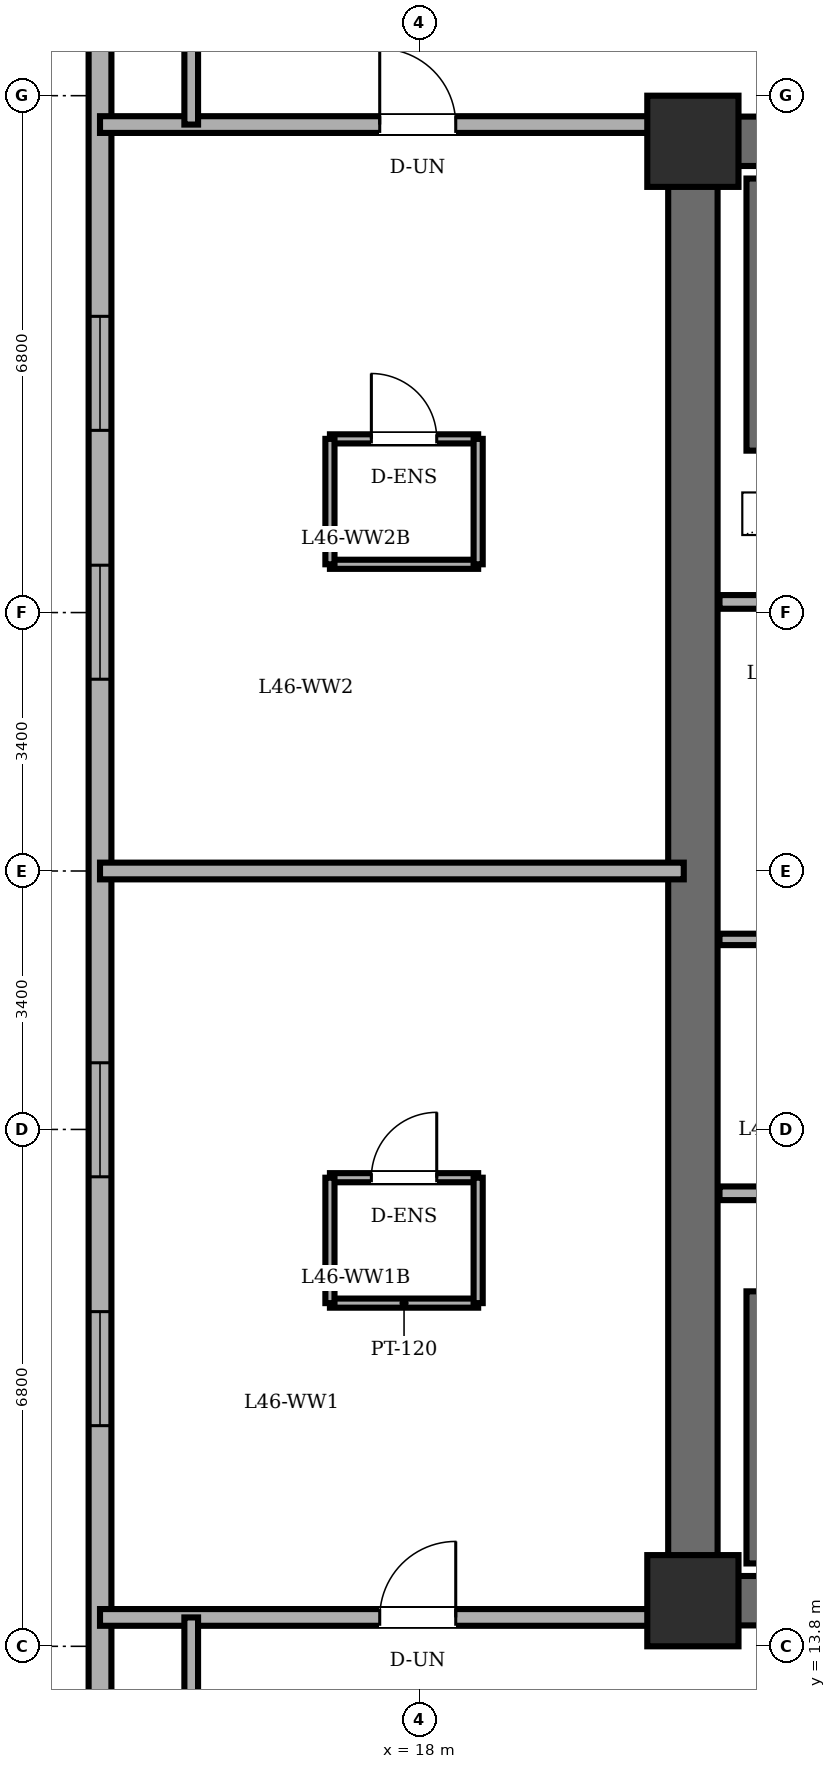
"""IFC4 building model, lengths in metres.
Left out: names, types, materials, properties, quantities, classifications, styles, units other than length and angle.
Written with IfcOpenShell. Run it as: python <this file> out.ifc"""

import sys

from ifc_helpers import new_model, si_unit, direction, frame, frame_2d, origin, origin_2d, place, context, subcontext, project, spatial, rectangle, extrude, element, fill, save


model = new_model("IFC4")
c1 = context("Model", 3, precision=1e-05, world=origin(), true_north=direction((0.0, 1.0)))
c2 = subcontext(c1, "Body", "Model", "MODEL_VIEW")
j1 = project(units=[si_unit("LENGTHUNIT", "METRE"), si_unit("PLANEANGLEUNIT", "RADIAN")], contexts=[c1])
p1 = place(None, origin())
s1 = spatial("IfcSite", under=j1, at=p1, CompositionType="ELEMENT")
p2 = place(p1, origin())
s2 = spatial("IfcBuilding", under=s1, at=p2, CompositionType="ELEMENT")
p3 = place(p2, frame((0.0, 0.0, 176.2)))
s3 = spatial("IfcBuildingStorey", under=s2, at=p3, CompositionType="ELEMENT", Elevation=176.2)
for number, where, z_axis, x_axis in (
    (1, (21.6, 14.4, 0.0), (0.0, 0.0, 1.0), (1.0, 0.0, 0.0)),
    (2, (21.6, 33.6, 0.0), (0.0, 0.0, 1.0), (1.0, 0.0, 0.0)),
):
    element("IfcColumn", number, at=place(p3, frame(where, z_axis=z_axis, x_axis=x_axis)), inside=s3, PredefinedType="COLUMN", context=c2, shape_type="SweptSolid", body=[
        extrude(rectangle(XDim=1.2, YDim=1.2, at=origin_2d()), origin(), (0.0, 0.0, 1.0), 3.6),
    ])
p4 = place(p3, frame((13.8, 36.3, 0.0), z_axis=(0.0, 0.0, 1.0), x_axis=(0.0, -1.0, 0.0)))
e3 = element("IfcWall", 3, at=p4, inside=s3, PredefinedType="SOLIDWALL", context=c2, shape_type="SweptSolid", body=[
    extrude(rectangle(XDim=24.6, YDim=0.3, at=frame_2d((12.3, 0.0))), origin(), (0.0, 0.0, 1.0), 3.4),
])
p5 = place(p4, frame((5.003, 0.0, 0.85)))
e4 = element("IfcOpeningElement", 4, at=p5, cuts=e3, PredefinedType="OPENING", context=c2, shape_type="SweptSolid", body=[
    extrude(rectangle(XDim=1.5, YDim=1.55, at=frame_2d((0.75, 0.775))), frame((0.0, 0.16, 0.0), z_axis=(0.0, -1.0, 0.0), x_axis=(1.0, 0.0, 0.0)), (0.0, 0.0, 1.0), 0.32),
])
p6 = place(p4, frame((8.277, 0.0, 0.85)))
e5 = element("IfcOpeningElement", 5, at=p6, cuts=e3, PredefinedType="OPENING", context=c2, shape_type="SweptSolid", body=[
    extrude(rectangle(XDim=1.5, YDim=1.55, at=frame_2d((0.75, 0.775))), frame((0.0, 0.16, 0.0), z_axis=(0.0, -1.0, 0.0), x_axis=(1.0, 0.0, 0.0)), (0.0, 0.0, 1.0), 0.32),
])
p7 = place(p4, frame((14.823, 0.0, 0.85)))
e6 = element("IfcOpeningElement", 6, at=p7, cuts=e3, PredefinedType="OPENING", context=c2, shape_type="SweptSolid", body=[
    extrude(rectangle(XDim=1.5, YDim=1.55, at=frame_2d((0.75, 0.775))), frame((0.0, 0.16, 0.0), z_axis=(0.0, -1.0, 0.0), x_axis=(1.0, 0.0, 0.0)), (0.0, 0.0, 1.0), 0.32),
])
p8 = place(p4, frame((18.097, 0.0, 0.85)))
e7 = element("IfcOpeningElement", 7, at=p8, cuts=e3, PredefinedType="OPENING", context=c2, shape_type="SweptSolid", body=[
    extrude(rectangle(XDim=1.5, YDim=1.55, at=frame_2d((0.75, 0.775))), frame((0.0, 0.16, 0.0), z_axis=(0.0, -1.0, 0.0), x_axis=(1.0, 0.0, 0.0)), (0.0, 0.0, 1.0), 0.32),
])
p9 = place(p3, frame((21.6, 14.4, 0.0), z_axis=(0.0, 0.0, 1.0), x_axis=(0.0, 1.0, 0.0)))
e8 = element("IfcWall", 8, at=p9, inside=s3, PredefinedType="SHEAR", context=c2, shape_type="SweptSolid", body=[
    extrude(rectangle(XDim=19.2, YDim=0.65, at=frame_2d((9.6, 0.0))), origin(), (0.0, 0.0, 1.0), 3.4),
])
for number, where, z_axis, x_axis in (
    (9, (21.6, 33.6, 0.0), (0.0, 0.0, 1.0), (1.0, 0.0, 0.0)),
    (10, (37.2, 14.4, 0.0), (0.0, 0.0, 1.0), (-1.0, 0.0, 0.0)),
):
    element("IfcWall", number, at=place(p3, frame(where, z_axis=z_axis, x_axis=x_axis)), inside=s3, PredefinedType="SHEAR", context=c2, shape_type="SweptSolid", body=[
        extrude(rectangle(XDim=15.6, YDim=0.65, at=frame_2d((7.8, 0.0))), origin(), (0.0, 0.0, 1.0), 3.4),
    ])
for number, where, z_axis, x_axis in (
    (11, (22.48, 29.53, 0.0), (0.0, 0.0, 1.0), (0.0, 1.0, 0.0)),
    (12, (22.48, 14.89, 0.0), (0.0, 0.0, 1.0), (0.0, 1.0, 0.0)),
):
    element("IfcWall", number, at=place(p3, frame(where, z_axis=z_axis, x_axis=x_axis)), inside=s3, PredefinedType="SOLIDWALL", context=c2, shape_type="SweptSolid", body=[
        extrude(rectangle(XDim=3.58, YDim=0.35, at=frame_2d((1.79, 0.0))), origin(), (0.0, 0.0, 1.0), 3.4),
    ])
p10 = place(p3, frame((21.95, 27.54, 0.0), z_axis=(0.0, 0.0, 1.0), x_axis=(1.0, 0.0, 0.0)))
e13 = element("IfcWall", 13, at=p10, inside=s3, PredefinedType="PARTITIONING", context=c2, shape_type="SweptSolid", body=[
    extrude(rectangle(XDim=10.56, YDim=0.18, at=frame_2d((5.28, 0.0))), origin(), (0.0, 0.0, 1.0), 3.4),
])
p11 = place(p3, frame((21.95, 19.76, 0.0), z_axis=(0.0, 0.0, 1.0), x_axis=(1.0, 0.0, 0.0)))
e14 = element("IfcWall", 14, at=p11, inside=s3, PredefinedType="PARTITIONING", context=c2, shape_type="SweptSolid", body=[
    extrude(rectangle(XDim=14.87, YDim=0.18, at=frame_2d((7.435, 0.0))), origin(), (0.0, 0.0, 1.0), 3.4),
])
p12 = place(p3, frame((21.95, 23.1, 0.0), z_axis=(0.0, 0.0, 1.0), x_axis=(1.0, 0.0, 0.0)))
e15 = element("IfcWall", 15, at=p12, inside=s3, PredefinedType="PARTITIONING", context=c2, shape_type="SweptSolid", body=[
    extrude(rectangle(XDim=2.51, YDim=0.15, at=frame_2d((1.255, 0.0))), origin(), (0.0, 0.0, 1.0), 3.4),
])
p13 = place(p3, frame((16.825, 19.965, 0.0), z_axis=(0.0, 0.0, 1.0), x_axis=(1.0, 0.0, 0.0)))
e16 = element("IfcWall", 16, at=p13, inside=s3, PredefinedType="PARTITIONING", context=c2, shape_type="SweptSolid", body=[
    extrude(rectangle(XDim=1.95, YDim=0.12, at=frame_2d((0.975, 0.0))), origin(), (0.0, 0.0, 1.0), 3.4),
])
p14 = place(p13, frame((0.545, 0.0, 0.0)))
e17 = element("IfcOpeningElement", 17, at=p14, cuts=e16, PredefinedType="OPENING", context=c2, shape_type="SweptSolid", body=[
    extrude(rectangle(XDim=0.86, YDim=2.1, at=frame_2d((0.43, 1.05))), frame((0.0, 0.07, 0.0), z_axis=(0.0, -1.0, 0.0), x_axis=(1.0, 0.0, 0.0)), (0.0, 0.0, 1.0), 0.14),
])
p15 = place(p3, frame((18.775, 18.315, 0.0), z_axis=(0.0, 0.0, 1.0), x_axis=(-1.0, 0.0, 0.0)))
e18 = element("IfcWall", 18, at=p15, inside=s3, PredefinedType="PARTITIONING", context=c2, shape_type="SweptSolid", body=[
    extrude(rectangle(XDim=1.95, YDim=0.12, at=frame_2d((0.975, 0.0))), origin(), (0.0, 0.0, 1.0), 3.4),
])
for number, where, z_axis, x_axis in (
    (19, (16.825, 19.965, 0.0), (0.0, 0.0, 1.0), (0.0, -1.0, 0.0)),
    (20, (18.775, 18.315, 0.0), (0.0, 0.0, 1.0), (0.0, 1.0, 0.0)),
):
    element("IfcWall", number, at=place(p3, frame(where, z_axis=z_axis, x_axis=x_axis)), inside=s3, PredefinedType="PARTITIONING", context=c2, shape_type="SweptSolid", body=[
        extrude(rectangle(XDim=1.65, YDim=0.12, at=frame_2d((0.825, 0.0))), origin(), (0.0, 0.0, 1.0), 3.4),
    ])
p16 = place(p3, frame((16.825, 29.685, 0.0), z_axis=(0.0, 0.0, 1.0), x_axis=(1.0, 0.0, 0.0)))
e21 = element("IfcWall", 21, at=p16, inside=s3, PredefinedType="PARTITIONING", context=c2, shape_type="SweptSolid", body=[
    extrude(rectangle(XDim=1.95, YDim=0.12, at=frame_2d((0.975, 0.0))), origin(), (0.0, 0.0, 1.0), 3.4),
])
p17 = place(p16, frame((0.545, 0.0, 0.0)))
e22 = element("IfcOpeningElement", 22, at=p17, cuts=e21, PredefinedType="OPENING", context=c2, shape_type="SweptSolid", body=[
    extrude(rectangle(XDim=0.86, YDim=2.1, at=frame_2d((0.43, 1.05))), frame((0.0, 0.07, 0.0), z_axis=(0.0, -1.0, 0.0), x_axis=(1.0, 0.0, 0.0)), (0.0, 0.0, 1.0), 0.14),
])
p18 = place(p3, frame((18.775, 28.035, 0.0), z_axis=(0.0, 0.0, 1.0), x_axis=(-1.0, 0.0, 0.0)))
e23 = element("IfcWall", 23, at=p18, inside=s3, PredefinedType="PARTITIONING", context=c2, shape_type="SweptSolid", body=[
    extrude(rectangle(XDim=1.95, YDim=0.12, at=frame_2d((0.975, 0.0))), origin(), (0.0, 0.0, 1.0), 3.4),
])
for number, where, z_axis, x_axis in (
    (24, (16.825, 29.685, 0.0), (0.0, 0.0, 1.0), (0.0, -1.0, 0.0)),
    (25, (18.775, 28.035, 0.0), (0.0, 0.0, 1.0), (0.0, 1.0, 0.0)),
):
    element("IfcWall", number, at=place(p3, frame(where, z_axis=z_axis, x_axis=x_axis)), inside=s3, PredefinedType="PARTITIONING", context=c2, shape_type="SweptSolid", body=[
        extrude(rectangle(XDim=1.65, YDim=0.12, at=frame_2d((0.825, 0.0))), origin(), (0.0, 0.0, 1.0), 3.4),
    ])
p19 = place(p3, frame((13.8, 14.18, 0.0), z_axis=(0.0, 0.0, 1.0), x_axis=(1.0, 0.0, 0.0)))
e26 = element("IfcWall", 26, at=p19, inside=s3, PredefinedType="PARTITIONING", context=c2, shape_type="SweptSolid", body=[
    extrude(rectangle(XDim=7.68, YDim=0.22, at=frame_2d((3.84, 0.0))), origin(), (0.0, 0.0, 1.0), 3.4),
])
p20 = place(p19, frame((3.68, 0.0, 0.0)))
e27 = element("IfcOpeningElement", 27, at=p20, cuts=e26, PredefinedType="OPENING", context=c2, shape_type="SweptSolid", body=[
    extrude(rectangle(XDim=1.0, YDim=2.15, at=frame_2d((0.5, 1.075))), frame((0.0, 0.12, 0.0), z_axis=(0.0, -1.0, 0.0), x_axis=(1.0, 0.0, 0.0)), (0.0, 0.0, 1.0), 0.24),
])
p21 = place(p3, frame((13.8, 24.0, 0.0), z_axis=(0.0, 0.0, 1.0), x_axis=(1.0, 0.0, 0.0)))
e28 = element("IfcWall", 28, at=p21, inside=s3, PredefinedType="PARTITIONING", context=c2, shape_type="SweptSolid", body=[
    extrude(rectangle(XDim=7.68, YDim=0.22, at=frame_2d((3.84, 0.0))), origin(), (0.0, 0.0, 1.0), 3.4),
])
p22 = place(p3, frame((13.8, 33.82, 0.0), z_axis=(0.0, 0.0, 1.0), x_axis=(1.0, 0.0, 0.0)))
e29 = element("IfcWall", 29, at=p22, inside=s3, PredefinedType="PARTITIONING", context=c2, shape_type="SweptSolid", body=[
    extrude(rectangle(XDim=7.68, YDim=0.22, at=frame_2d((3.84, 0.0))), origin(), (0.0, 0.0, 1.0), 3.4),
])
p23 = place(p22, frame((3.68, 0.0, 0.0)))
e30 = element("IfcOpeningElement", 30, at=p23, cuts=e29, PredefinedType="OPENING", context=c2, shape_type="SweptSolid", body=[
    extrude(rectangle(XDim=1.0, YDim=2.15, at=frame_2d((0.5, 1.075))), frame((0.0, 0.12, 0.0), z_axis=(0.0, -1.0, 0.0), x_axis=(1.0, 0.0, 0.0)), (0.0, 0.0, 1.0), 0.24),
])
for number, where, z_axis, x_axis in (
    (31, (15.0, 8.487, 0.0), (0.0, 0.0, 1.0), (0.0, 1.0, 0.0)),
    (32, (15.0, 33.82, 0.0), (0.0, 0.0, 1.0), (0.0, 1.0, 0.0)),
):
    element("IfcWall", number, at=place(p3, frame(where, z_axis=z_axis, x_axis=x_axis)), inside=s3, PredefinedType="PARTITIONING", context=c2, shape_type="SweptSolid", body=[
        extrude(rectangle(XDim=5.693, YDim=0.18, at=frame_2d((2.846, 0.0))), origin(), (0.0, 0.0, 1.0), 3.4),
    ])
p24 = place(p5, origin())
e33 = element("IfcWindow", 33, at=p24, inside=s3, PartitioningType="DOUBLE_PANEL_VERTICAL", PredefinedType="WINDOW", context=c2, shape_type="SweptSolid", body=[
    extrude(rectangle(XDim=1.5, YDim=1.55, at=frame_2d((0.75, 0.775))), frame((0.0, 0.03, 0.0), z_axis=(0.0, -1.0, 0.0), x_axis=(1.0, 0.0, 0.0)), (0.0, 0.0, 1.0), 0.06),
])
fill(e4, e33)
p25 = place(p6, origin())
e34 = element("IfcWindow", 34, at=p25, inside=s3, PartitioningType="DOUBLE_PANEL_VERTICAL", PredefinedType="WINDOW", context=c2, shape_type="SweptSolid", body=[
    extrude(rectangle(XDim=1.5, YDim=1.55, at=frame_2d((0.75, 0.775))), frame((0.0, 0.03, 0.0), z_axis=(0.0, -1.0, 0.0), x_axis=(1.0, 0.0, 0.0)), (0.0, 0.0, 1.0), 0.06),
])
fill(e5, e34)
p26 = place(p7, origin())
e35 = element("IfcWindow", 35, at=p26, inside=s3, PartitioningType="DOUBLE_PANEL_VERTICAL", PredefinedType="WINDOW", context=c2, shape_type="SweptSolid", body=[
    extrude(rectangle(XDim=1.5, YDim=1.55, at=frame_2d((0.75, 0.775))), frame((0.0, 0.03, 0.0), z_axis=(0.0, -1.0, 0.0), x_axis=(1.0, 0.0, 0.0)), (0.0, 0.0, 1.0), 0.06),
])
fill(e6, e35)
p27 = place(p8, origin())
e36 = element("IfcWindow", 36, at=p27, inside=s3, PartitioningType="DOUBLE_PANEL_VERTICAL", PredefinedType="WINDOW", context=c2, shape_type="SweptSolid", body=[
    extrude(rectangle(XDim=1.5, YDim=1.55, at=frame_2d((0.75, 0.775))), frame((0.0, 0.03, 0.0), z_axis=(0.0, -1.0, 0.0), x_axis=(1.0, 0.0, 0.0)), (0.0, 0.0, 1.0), 0.06),
])
fill(e7, e36)
p28 = place(p14, origin())
e37 = element("IfcDoor", 37, at=p28, inside=s3, OperationType="SINGLE_SWING_RIGHT", PredefinedType="DOOR", context=c2, shape_type="SweptSolid", body=[
    extrude(rectangle(XDim=0.86, YDim=2.1, at=frame_2d((0.43, 1.05))), frame((0.0, 0.025, 0.0), z_axis=(0.0, -1.0, 0.0), x_axis=(1.0, 0.0, 0.0)), (0.0, 0.0, 1.0), 0.05),
])
fill(e17, e37)
p29 = place(p17, origin())
e38 = element("IfcDoor", 38, at=p29, inside=s3, OperationType="SINGLE_SWING_LEFT", PredefinedType="DOOR", context=c2, shape_type="SweptSolid", body=[
    extrude(rectangle(XDim=0.86, YDim=2.1, at=frame_2d((0.43, 1.05))), frame((0.0, 0.025, 0.0), z_axis=(0.0, -1.0, 0.0), x_axis=(1.0, 0.0, 0.0)), (0.0, 0.0, 1.0), 0.05),
])
fill(e22, e38)
p30 = place(p20, origin())
e39 = element("IfcDoor", 39, at=p30, inside=s3, OperationType="SINGLE_SWING_RIGHT", PredefinedType="DOOR", context=c2, shape_type="SweptSolid", body=[
    extrude(rectangle(XDim=1.0, YDim=2.15, at=frame_2d((0.5, 1.075))), frame((0.0, 0.025, 0.0), z_axis=(0.0, -1.0, 0.0), x_axis=(1.0, 0.0, 0.0)), (0.0, 0.0, 1.0), 0.05),
])
fill(e27, e39)
p31 = place(p23, origin())
e40 = element("IfcDoor", 40, at=p31, inside=s3, OperationType="SINGLE_SWING_LEFT", PredefinedType="DOOR", context=c2, shape_type="SweptSolid", body=[
    extrude(rectangle(XDim=1.0, YDim=2.15, at=frame_2d((0.5, 1.075))), frame((0.0, 0.025, 0.0), z_axis=(0.0, -1.0, 0.0), x_axis=(1.0, 0.0, 0.0)), (0.0, 0.0, 1.0), 0.05),
])
fill(e30, e40)
save(model, sys.argv[1])
